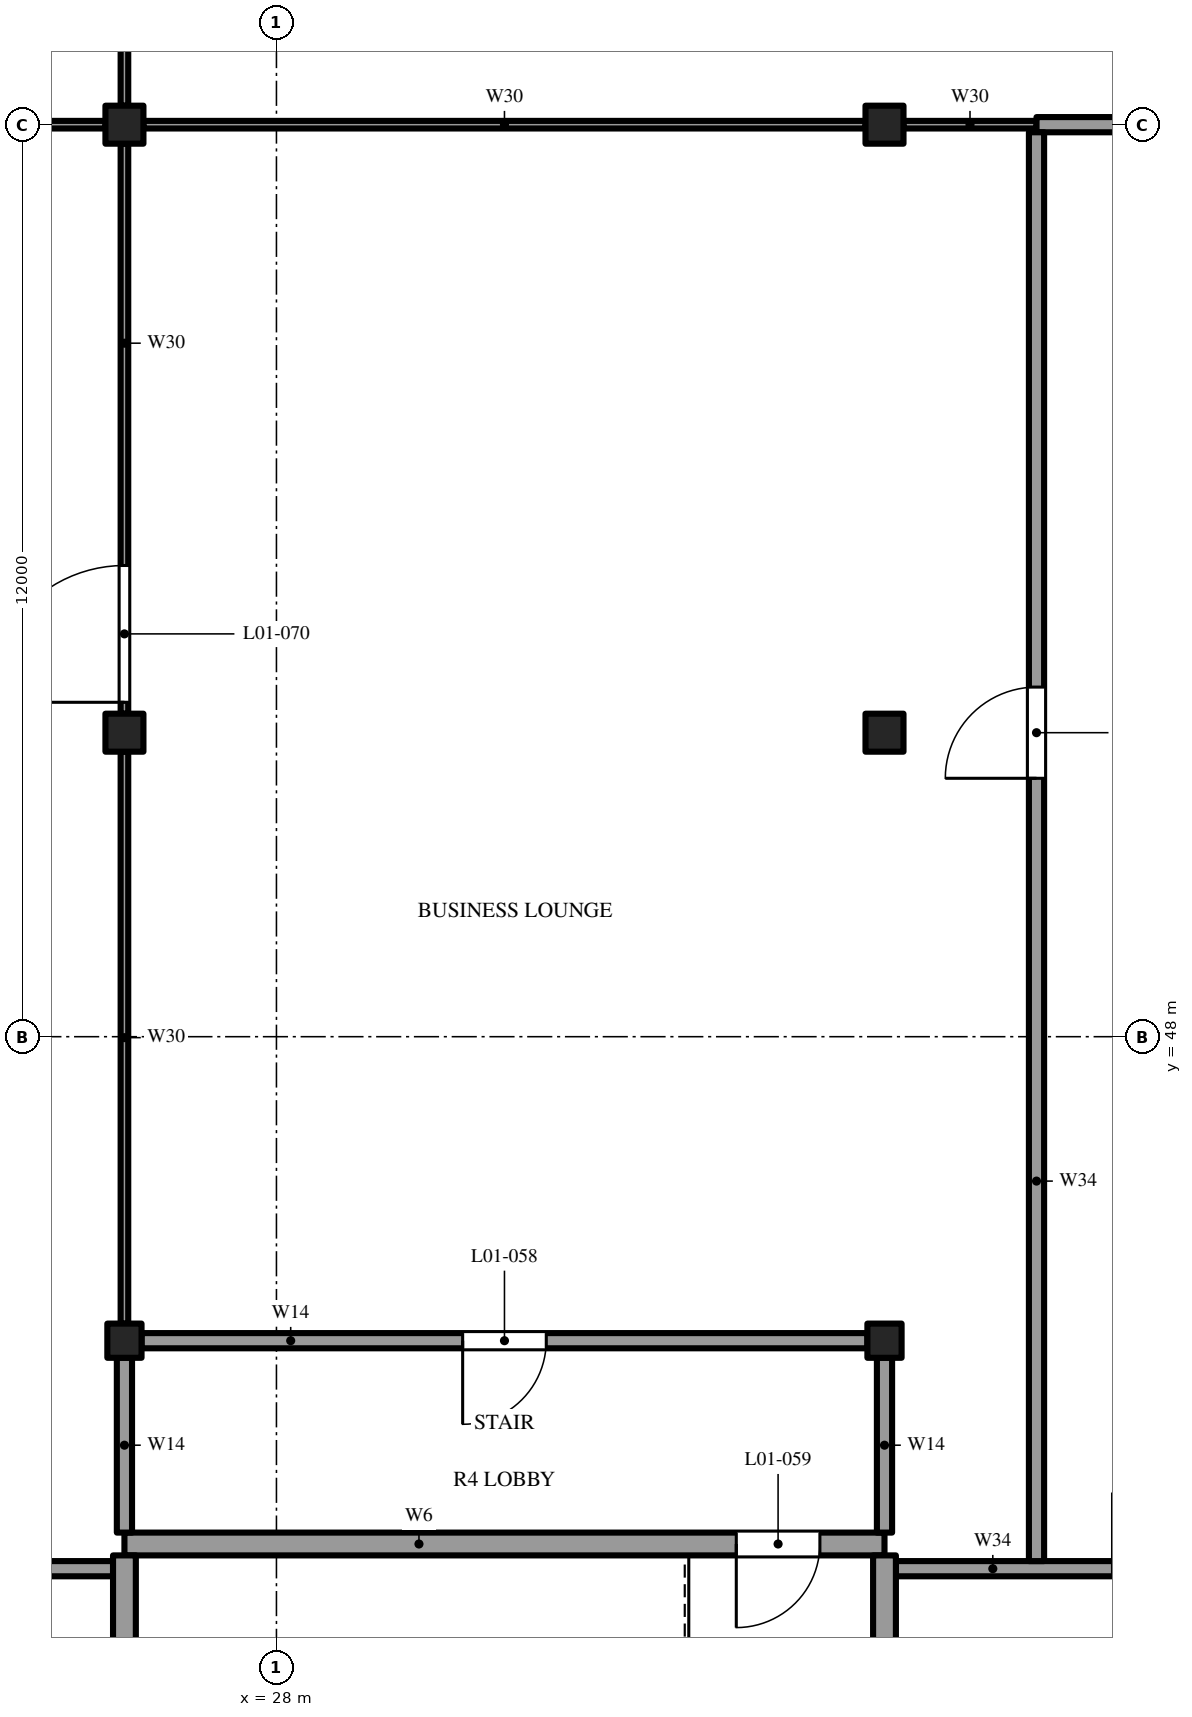
"""IFC4 building model, lengths in metres.
Left out: names, types, materials, properties, quantities, classifications, styles, units other than length and angle.
Written with IfcOpenShell. Run it as: python <this file> out.ifc"""

import sys

from ifc_helpers import new_model, si_unit, direction, frame, frame_2d, origin, origin_2d, place, context, subcontext, project, spatial, rectangle, extrude, element, fill, save


model = new_model("IFC4")
c1 = context("Model", 3, precision=1e-05, world=origin(), true_north=direction((0.0, 1.0)))
c2 = subcontext(c1, "Body", "Model", "MODEL_VIEW")
j1 = project(units=[si_unit("LENGTHUNIT", "METRE"), si_unit("PLANEANGLEUNIT", "RADIAN")], contexts=[c1])
p1 = place(None, origin())
s1 = spatial("IfcSite", under=j1, at=p1, CompositionType="ELEMENT")
p2 = place(p1, origin())
s2 = spatial("IfcBuilding", under=s1, at=p2, CompositionType="ELEMENT")
p3 = place(p2, frame((0.0, 0.0, 7.2)))
s3 = spatial("IfcBuildingStorey", under=s2, at=p3, CompositionType="ELEMENT", Elevation=7.2)
p4 = place(p3, frame((26.0, 44.0, 0.0), z_axis=(0.0, 0.0, 1.0), x_axis=(1.0, 0.0, 0.0)))
e1 = element("IfcColumn", 1, at=p4, inside=s3, PredefinedType="COLUMN", context=c2, shape_type="SweptSolid", body=[
    extrude(rectangle(XDim=0.45, YDim=0.45, at=origin_2d()), origin(), (0.0, 0.0, 1.0), 4.8),
])
for number, where, z_axis, x_axis in (
    (2, (26.0, 52.0, 0.0), (0.0, 0.0, 1.0), (1.0, 0.0, 0.0)),
    (3, (26.0, 60.0, 0.0), (0.0, 0.0, 1.0), (1.0, 0.0, 0.0)),
):
    element("IfcColumn", number, at=place(p3, frame(where, z_axis=z_axis, x_axis=x_axis)), inside=s3, PredefinedType="COLUMN", context=c2, shape_type="SweptSolid", body=[
        extrude(rectangle(XDim=0.5, YDim=0.5, at=origin_2d()), origin(), (0.0, 0.0, 1.0), 4.8),
    ])
p5 = place(p3, frame((36.0, 44.0, 0.0), z_axis=(0.0, 0.0, 1.0), x_axis=(1.0, 0.0, 0.0)))
e4 = element("IfcColumn", 4, at=p5, inside=s3, PredefinedType="COLUMN", context=c2, shape_type="SweptSolid", body=[
    extrude(rectangle(XDim=0.45, YDim=0.45, at=origin_2d()), origin(), (0.0, 0.0, 1.0), 4.8),
])
for number, where, z_axis, x_axis in (
    (5, (36.0, 52.0, 0.0), (0.0, 0.0, 1.0), (1.0, 0.0, 0.0)),
    (6, (36.0, 60.0, 0.0), (0.0, 0.0, 1.0), (1.0, 0.0, 0.0)),
):
    element("IfcColumn", number, at=place(p3, frame(where, z_axis=z_axis, x_axis=x_axis)), inside=s3, PredefinedType="COLUMN", context=c2, shape_type="SweptSolid", body=[
        extrude(rectangle(XDim=0.5, YDim=0.5, at=origin_2d()), origin(), (0.0, 0.0, 1.0), 4.8),
    ])
p6 = place(p3, frame((6.225, 41.0, 0.0), z_axis=(0.0, 0.0, 1.0), x_axis=(1.0, 0.0, 0.0)))
e7 = element("IfcWall", 7, at=p6, inside=s3, PredefinedType="PARTITIONING", context=c2, shape_type="SweptSolid", body=[
    extrude(rectangle(XDim=19.625, YDim=0.2, at=frame_2d((9.812, 0.0))), origin(), (0.0, 0.0, 1.0), 4.45),
])
p7 = place(p6, frame((1.775, 0.0, 0.0)))
e8 = element("IfcOpeningElement", 8, at=p7, cuts=e7, PredefinedType="OPENING", context=c2, shape_type="SweptSolid", body=[
    extrude(rectangle(XDim=1.0, YDim=2.1, at=frame_2d((0.5, 1.05))), frame((0.0, 0.11, 0.0), z_axis=(0.0, -1.0, 0.0), x_axis=(1.0, 0.0, 0.0)), (0.0, 0.0, 1.0), 0.22),
])
p8 = place(p6, frame((6.775, 0.0, 0.0)))
e9 = element("IfcOpeningElement", 9, at=p8, cuts=e7, PredefinedType="OPENING", context=c2, shape_type="SweptSolid", body=[
    extrude(rectangle(XDim=1.0, YDim=2.1, at=frame_2d((0.5, 1.05))), frame((0.0, 0.11, 0.0), z_axis=(0.0, -1.0, 0.0), x_axis=(1.0, 0.0, 0.0)), (0.0, 0.0, 1.0), 0.22),
])
p9 = place(p6, frame((11.775, 0.0, 0.0)))
e10 = element("IfcOpeningElement", 10, at=p9, cuts=e7, PredefinedType="OPENING", context=c2, shape_type="SweptSolid", body=[
    extrude(rectangle(XDim=1.0, YDim=2.1, at=frame_2d((0.5, 1.05))), frame((0.0, 0.11, 0.0), z_axis=(0.0, -1.0, 0.0), x_axis=(1.0, 0.0, 0.0)), (0.0, 0.0, 1.0), 0.22),
])
p10 = place(p6, frame((16.775, 0.0, 0.0)))
e11 = element("IfcOpeningElement", 11, at=p10, cuts=e7, PredefinedType="OPENING", context=c2, shape_type="SweptSolid", body=[
    extrude(rectangle(XDim=1.0, YDim=2.1, at=frame_2d((0.5, 1.05))), frame((0.0, 0.11, 0.0), z_axis=(0.0, -1.0, 0.0), x_axis=(1.0, 0.0, 0.0)), (0.0, 0.0, 1.0), 0.22),
])
p11 = place(p3, frame((36.15, 41.0, 0.0), z_axis=(0.0, 0.0, 1.0), x_axis=(1.0, 0.0, 0.0)))
e12 = element("IfcWall", 12, at=p11, inside=s3, PredefinedType="PARTITIONING", context=c2, shape_type="SweptSolid", body=[
    extrude(rectangle(XDim=9.625, YDim=0.2, at=frame_2d((4.812, 0.0))), origin(), (0.0, 0.0, 1.0), 4.45),
])
p12 = place(p11, frame((2.85, 0.0, 0.0)))
e13 = element("IfcOpeningElement", 13, at=p12, cuts=e12, PredefinedType="OPENING", context=c2, shape_type="SweptSolid", body=[
    extrude(rectangle(XDim=1.0, YDim=2.1, at=frame_2d((0.5, 1.05))), frame((0.0, 0.11, 0.0), z_axis=(0.0, -1.0, 0.0), x_axis=(1.0, 0.0, 0.0)), (0.0, 0.0, 1.0), 0.22),
])
p13 = place(p11, frame((6.85, 0.0, 0.0)))
e14 = element("IfcOpeningElement", 14, at=p13, cuts=e12, PredefinedType="OPENING", context=c2, shape_type="SweptSolid", body=[
    extrude(rectangle(XDim=1.0, YDim=2.1, at=frame_2d((0.5, 1.05))), frame((0.0, 0.11, 0.0), z_axis=(0.0, -1.0, 0.0), x_axis=(1.0, 0.0, 0.0)), (0.0, 0.0, 1.0), 0.22),
])
p14 = place(p3, frame((26.0, 41.325, 0.0), z_axis=(0.0, 0.0, 1.0), x_axis=(1.0, 0.0, 0.0)))
e15 = element("IfcWall", 15, at=p14, inside=s3, PredefinedType="SHEAR", context=c2, shape_type="SweptSolid", body=[
    extrude(rectangle(XDim=10.0, YDim=0.3, at=frame_2d((5.0, 0.0))), origin(), (0.0, 0.0, 1.0), 4.45),
])
p15 = place(p14, frame((8.05, 0.0, 0.0)))
e16 = element("IfcOpeningElement", 16, at=p15, cuts=e15, PredefinedType="OPENING", context=c2, shape_type="SweptSolid", body=[
    extrude(rectangle(XDim=1.1, YDim=2.1, at=frame_2d((0.55, 1.05))), frame((0.0, 0.16, 0.0), z_axis=(0.0, -1.0, 0.0), x_axis=(1.0, 0.0, 0.0)), (0.0, 0.0, 1.0), 0.32),
])
p16 = place(p3, frame((26.225, 44.0, 0.0), z_axis=(0.0, 0.0, 1.0), x_axis=(1.0, 0.0, 0.0)))
e17 = element("IfcWall", 17, at=p16, inside=s3, PredefinedType="SOLIDWALL", context=c2, shape_type="SweptSolid", body=[
    extrude(rectangle(XDim=9.55, YDim=0.2, at=frame_2d((4.775, 0.0))), origin(), (0.0, 0.0, 1.0), 4.45),
])
p17 = place(p16, frame((4.225, 0.0, 0.0)))
e18 = element("IfcOpeningElement", 18, at=p17, cuts=e17, PredefinedType="OPENING", context=c2, shape_type="SweptSolid", body=[
    extrude(rectangle(XDim=1.1, YDim=2.1, at=frame_2d((0.55, 1.05))), frame((0.0, 0.11, 0.0), z_axis=(0.0, -1.0, 0.0), x_axis=(1.0, 0.0, 0.0)), (0.0, 0.0, 1.0), 0.22),
])
for number, where, z_axis, x_axis in (
    (19, (16.25, 60.0, 0.0), (0.0, 0.0, 1.0), (1.0, 0.0, 0.0)),
    (20, (26.25, 60.0, 0.0), (0.0, 0.0, 1.0), (1.0, 0.0, 0.0)),
):
    element("IfcWall", number, at=place(p3, frame(where, z_axis=z_axis, x_axis=x_axis)), inside=s3, PredefinedType="PARTITIONING", context=c2, shape_type="SweptSolid", body=[
        extrude(rectangle(XDim=9.5, YDim=0.1, at=frame_2d((4.75, 0.0))), origin(), (0.0, 0.0, 1.0), 4.45),
    ])
p18 = place(p3, frame((36.25, 60.0, 0.0), z_axis=(0.0, 0.0, 1.0), x_axis=(1.0, 0.0, 0.0)))
e21 = element("IfcWall", 21, at=p18, inside=s3, PredefinedType="PARTITIONING", context=c2, shape_type="SweptSolid", body=[
    extrude(rectangle(XDim=1.75, YDim=0.1, at=frame_2d((0.875, 0.0))), origin(), (0.0, 0.0, 1.0), 4.45),
])
p19 = place(p3, frame((38.0, 60.0, 0.0), z_axis=(0.0, 0.0, 1.0), x_axis=(1.0, 0.0, 0.0)))
e22 = element("IfcWall", 22, at=p19, inside=s3, PredefinedType="PARTITIONING", context=c2, shape_type="SweptSolid", body=[
    extrude(rectangle(XDim=7.775, YDim=0.2, at=frame_2d((3.887, 0.0))), origin(), (0.0, 0.0, 1.0), 4.45),
])
p20 = place(p3, frame((26.0, 36.225, 0.0), z_axis=(0.0, 0.0, 1.0), x_axis=(0.0, 1.0, 0.0)))
e23 = element("IfcWall", 23, at=p20, inside=s3, PredefinedType="SHEAR", context=c2, shape_type="SweptSolid", body=[
    extrude(rectangle(XDim=4.95, YDim=0.3, at=frame_2d((2.475, 0.0))), origin(), (0.0, 0.0, 1.0), 4.45),
])
p21 = place(p3, frame((26.0, 41.475, 0.0), z_axis=(0.0, 0.0, 1.0), x_axis=(0.0, 1.0, 0.0)))
e24 = element("IfcWall", 24, at=p21, inside=s3, PredefinedType="SOLIDWALL", context=c2, shape_type="SweptSolid", body=[
    extrude(rectangle(XDim=2.3, YDim=0.2, at=frame_2d((1.15, 0.0))), origin(), (0.0, 0.0, 1.0), 4.45),
])
p22 = place(p3, frame((26.0, 44.225, 0.0), z_axis=(0.0, 0.0, 1.0), x_axis=(0.0, 1.0, 0.0)))
e25 = element("IfcWall", 25, at=p22, inside=s3, PredefinedType="PARTITIONING", context=c2, shape_type="SweptSolid", body=[
    extrude(rectangle(XDim=7.525, YDim=0.1, at=frame_2d((3.762, 0.0))), origin(), (0.0, 0.0, 1.0), 4.45),
])
p23 = place(p3, frame((26.0, 52.25, 0.0), z_axis=(0.0, 0.0, 1.0), x_axis=(0.0, 1.0, 0.0)))
e26 = element("IfcWall", 26, at=p23, inside=s3, PredefinedType="PARTITIONING", context=c2, shape_type="SweptSolid", body=[
    extrude(rectangle(XDim=7.5, YDim=0.1, at=frame_2d((3.75, 0.0))), origin(), (0.0, 0.0, 1.0), 4.45),
])
p24 = place(p23, frame((0.15, 0.0, 0.0)))
e27 = element("IfcOpeningElement", 27, at=p24, cuts=e26, PredefinedType="OPENING", context=c2, shape_type="SweptSolid", body=[
    extrude(rectangle(XDim=1.8, YDim=2.1, at=frame_2d((0.9, 1.05))), frame((0.0, 0.06, 0.0), z_axis=(0.0, -1.0, 0.0), x_axis=(1.0, 0.0, 0.0)), (0.0, 0.0, 1.0), 0.12),
])
p25 = place(p3, frame((26.0, 60.25, 0.0), z_axis=(0.0, 0.0, 1.0), x_axis=(0.0, 1.0, 0.0)))
e28 = element("IfcWall", 28, at=p25, inside=s3, PredefinedType="PARTITIONING", context=c2, shape_type="SweptSolid", body=[
    extrude(rectangle(XDim=5.65, YDim=0.1, at=frame_2d((2.825, 0.0))), origin(), (0.0, 0.0, 1.0), 4.45),
])
p26 = place(p3, frame((36.0, 36.225, 0.0), z_axis=(0.0, 0.0, 1.0), x_axis=(0.0, 1.0, 0.0)))
e29 = element("IfcWall", 29, at=p26, inside=s3, PredefinedType="SHEAR", context=c2, shape_type="SweptSolid", body=[
    extrude(rectangle(XDim=4.95, YDim=0.3, at=frame_2d((2.475, 0.0))), origin(), (0.0, 0.0, 1.0), 4.45),
])
p27 = place(p3, frame((36.0, 41.475, 0.0), z_axis=(0.0, 0.0, 1.0), x_axis=(0.0, 1.0, 0.0)))
e30 = element("IfcWall", 30, at=p27, inside=s3, PredefinedType="SOLIDWALL", context=c2, shape_type="SweptSolid", body=[
    extrude(rectangle(XDim=2.3, YDim=0.2, at=frame_2d((1.15, 0.0))), origin(), (0.0, 0.0, 1.0), 4.45),
])
p28 = place(p3, frame((38.0, 41.1, 0.0), z_axis=(0.0, 0.0, 1.0), x_axis=(0.0, 1.0, 0.0)))
e31 = element("IfcWall", 31, at=p28, inside=s3, PredefinedType="PARTITIONING", context=c2, shape_type="SweptSolid", body=[
    extrude(rectangle(XDim=18.8, YDim=0.2, at=frame_2d((9.4, 0.0))), origin(), (0.0, 0.0, 1.0), 4.45),
])
p29 = place(p28, frame((10.3, 0.0, 0.0)))
e32 = element("IfcOpeningElement", 32, at=p29, cuts=e31, PredefinedType="OPENING", context=c2, shape_type="SweptSolid", body=[
    extrude(rectangle(XDim=1.2, YDim=2.1, at=frame_2d((0.6, 1.05))), frame((0.0, 0.11, 0.0), z_axis=(0.0, -1.0, 0.0), x_axis=(1.0, 0.0, 0.0)), (0.0, 0.0, 1.0), 0.22),
])
p30 = place(p17, frame((1.1, 0.0, 0.0), z_axis=(0.0, 0.0, 1.0), x_axis=(-1.0, 0.0, 0.0)))
e33 = element("IfcDoor", 33, at=p30, inside=s3, OperationType="SINGLE_SWING_RIGHT", PredefinedType="DOOR", context=c2, shape_type="SweptSolid", body=[
    extrude(rectangle(XDim=1.1, YDim=2.1, at=frame_2d((0.55, 1.05))), frame((0.0, 0.025, 0.0), z_axis=(0.0, -1.0, 0.0), x_axis=(1.0, 0.0, 0.0)), (0.0, 0.0, 1.0), 0.05),
])
fill(e18, e33)
p31 = place(p15, frame((1.1, 0.0, 0.0), z_axis=(0.0, 0.0, 1.0), x_axis=(-1.0, 0.0, 0.0)))
e34 = element("IfcDoor", 34, at=p31, inside=s3, OperationType="SINGLE_SWING_LEFT", PredefinedType="DOOR", context=c2, shape_type="SweptSolid", body=[
    extrude(rectangle(XDim=1.1, YDim=2.1, at=frame_2d((0.55, 1.05))), frame((0.0, 0.025, 0.0), z_axis=(0.0, -1.0, 0.0), x_axis=(1.0, 0.0, 0.0)), (0.0, 0.0, 1.0), 0.05),
])
fill(e16, e34)
p32 = place(p24, origin())
e35 = element("IfcDoor", 35, at=p32, inside=s3, OperationType="DOUBLE_DOOR_SINGLE_SWING", PredefinedType="DOOR", context=c2, shape_type="SweptSolid", body=[
    extrude(rectangle(XDim=1.8, YDim=2.1, at=frame_2d((0.9, 1.05))), frame((0.0, 0.025, 0.0), z_axis=(0.0, -1.0, 0.0), x_axis=(1.0, 0.0, 0.0)), (0.0, 0.0, 1.0), 0.05),
])
fill(e27, e35)
p33 = place(p29, origin())
e36 = element("IfcDoor", 36, at=p33, inside=s3, OperationType="SINGLE_SWING_RIGHT", PredefinedType="DOOR", context=c2, shape_type="SweptSolid", body=[
    extrude(rectangle(XDim=1.2, YDim=2.1, at=frame_2d((0.6, 1.05))), frame((0.0, 0.025, 0.0), z_axis=(0.0, -1.0, 0.0), x_axis=(1.0, 0.0, 0.0)), (0.0, 0.0, 1.0), 0.05),
])
fill(e32, e36)
save(model, sys.argv[1])
